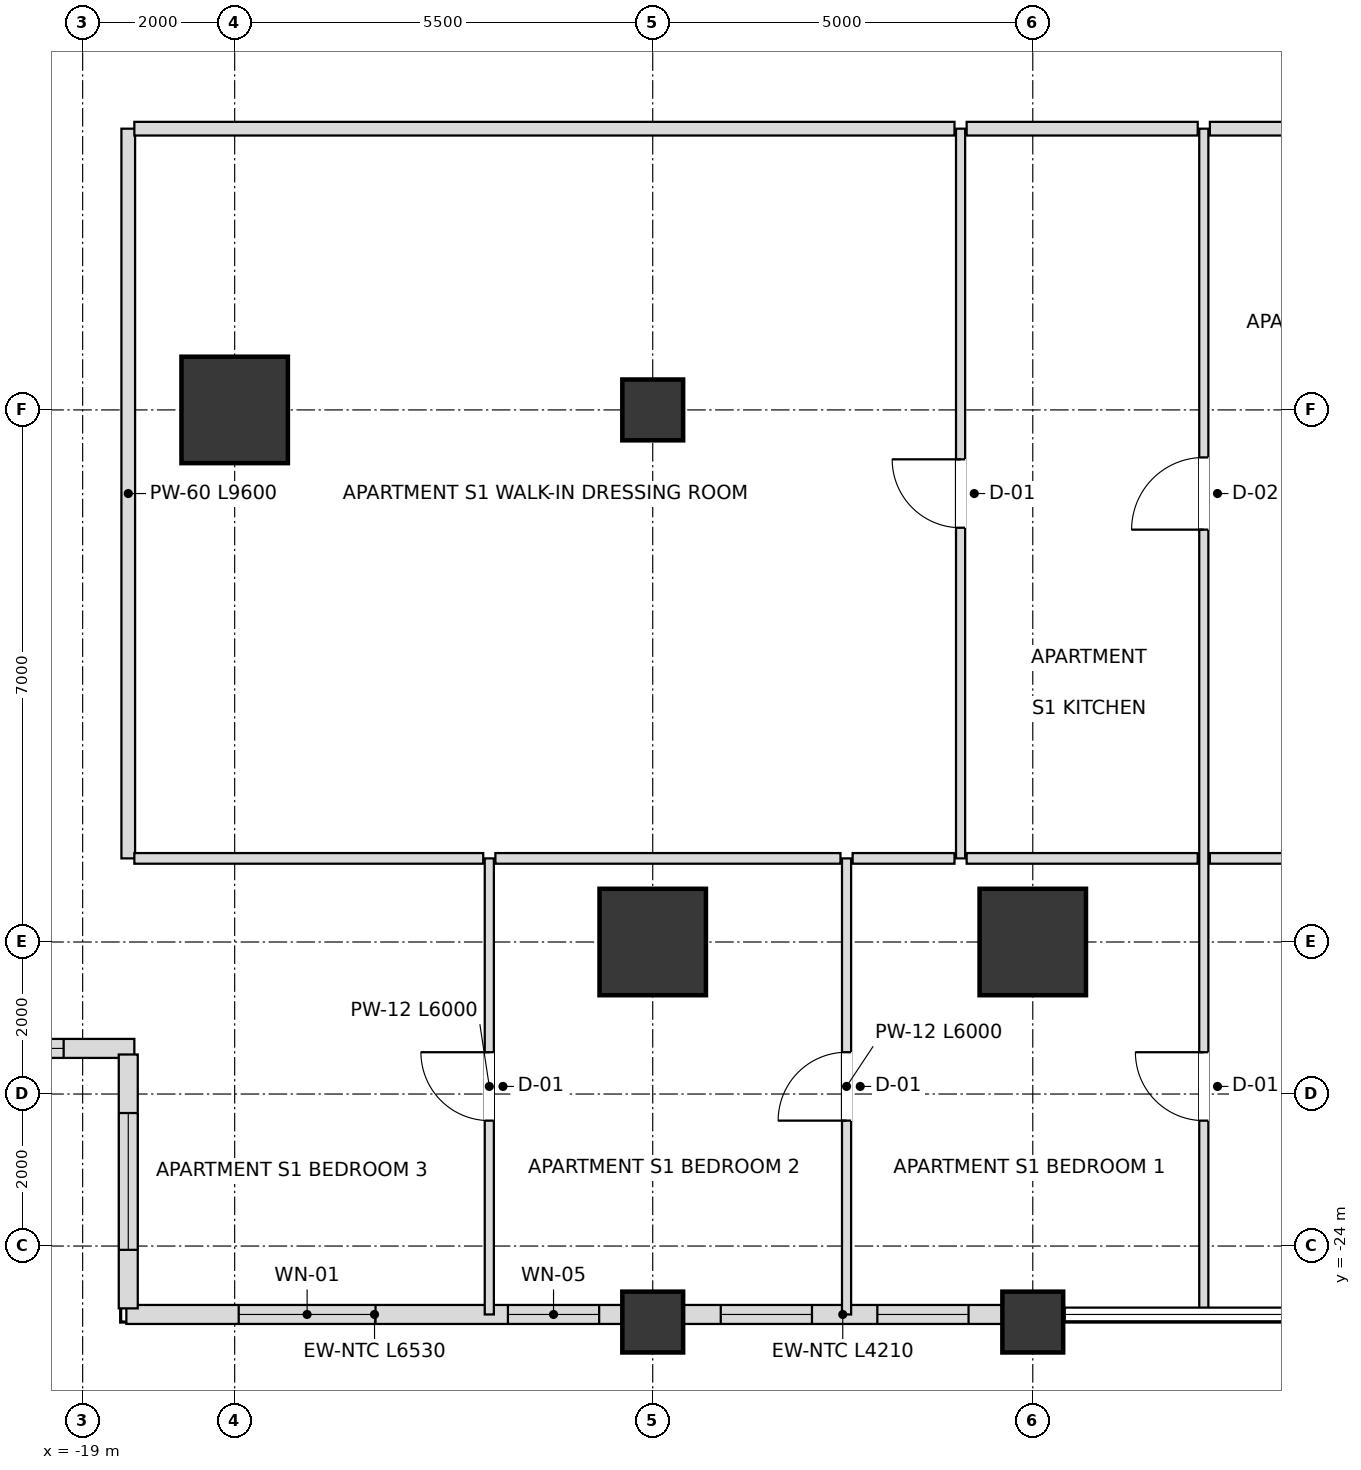
"""IFC4 building model, lengths in metres.
Left out: names, types, materials, properties, quantities, classifications, styles, units other than length and angle.
Written with IfcOpenShell. Run it as: python <this file> out.ifc"""

import sys

from ifc_helpers import new_model, si_unit, direction, frame, frame_2d, origin, origin_2d, place, context, subcontext, project, spatial, rectangle, extrude, element, fill, save


model = new_model("IFC4")
c1 = context("Model", 3, precision=1e-05, world=origin(), true_north=direction((0.0, 1.0)))
c2 = subcontext(c1, "Body", "Model", "MODEL_VIEW")
j1 = project(units=[si_unit("LENGTHUNIT", "METRE"), si_unit("PLANEANGLEUNIT", "RADIAN")], contexts=[c1])
p1 = place(None, origin())
s1 = spatial("IfcSite", under=j1, at=p1, CompositionType="ELEMENT")
p2 = place(p1, origin())
s2 = spatial("IfcBuilding", under=s1, at=p2, CompositionType="ELEMENT")
p3 = place(p2, frame((0.0, 0.0, 54.0)))
s3 = spatial("IfcBuildingStorey", under=s2, at=p3, CompositionType="ELEMENT", Elevation=54.0)
for number, where, z_axis, x_axis in (
    (1, (-11.5, -20.0, 0.0), (0.0, 0.0, 1.0), (1.0, 0.0, 0.0)),
    (2, (-6.5, -20.0, 0.0), (0.0, 0.0, 1.0), (1.0, 0.0, 0.0)),
    (3, (-17.0, -13.0, 0.0), (0.0, 0.0, 1.0), (1.0, 0.0, 0.0)),
):
    element("IfcColumn", number, at=place(p3, frame(where, z_axis=z_axis, x_axis=x_axis)), inside=s3, PredefinedType="USERDEFINED", context=c2, shape_type="SweptSolid", body=[
        extrude(rectangle(XDim=1.4, YDim=1.4, at=origin_2d()), origin(), (0.0, 0.0, 1.0), 3.6),
    ])
for number, where, z_axis, x_axis in (
    (4, (-11.5, -13.0, 0.0), (0.0, 0.0, 1.0), (1.0, 0.0, 0.0)),
    (5, (-11.5, -25.0, 0.0), (0.0, 0.0, 1.0), (1.0, 0.0, 0.0)),
    (6, (-6.5, -25.0, 0.0), (0.0, 0.0, 1.0), (1.0, 0.0, 0.0)),
):
    element("IfcColumn", number, at=place(p3, frame(where, z_axis=z_axis, x_axis=x_axis)), inside=s3, PredefinedType="COLUMN", context=c2, shape_type="SweptSolid", body=[
        extrude(rectangle(XDim=0.8, YDim=0.8, at=origin_2d()), origin(), (0.0, 0.0, 1.0), 3.6),
    ])
p4 = place(p3, frame((-18.425, -24.9, 0.0), z_axis=(0.0, 0.0, 1.0), x_axis=(1.0, 0.0, 0.0)))
e7 = element("IfcWall", 7, at=p4, inside=s3, PredefinedType="SOLIDWALL", context=c2, shape_type="SweptSolid", body=[
    extrude(rectangle(XDim=6.53, YDim=0.25, at=frame_2d((3.265, 0.0))), origin(), (0.0, 0.0, 1.0), 2.736),
])
p5 = place(p4, frame((1.478, 0.0, 0.72)))
e8 = element("IfcOpeningElement", 8, at=p5, cuts=e7, PredefinedType="OPENING", context=c2, shape_type="SweptSolid", body=[
    extrude(rectangle(XDim=1.8, YDim=1.68, at=frame_2d((0.9, 0.84))), frame((0.0, 0.135, 0.0), z_axis=(0.0, -1.0, 0.0), x_axis=(1.0, 0.0, 0.0)), (0.0, 0.0, 1.0), 0.27),
])
p6 = place(p4, frame((5.02, 0.0, 0.72)))
e9 = element("IfcOpeningElement", 9, at=p6, cuts=e7, PredefinedType="OPENING", context=c2, shape_type="SweptSolid", body=[
    extrude(rectangle(XDim=1.2, YDim=1.68, at=frame_2d((0.6, 0.84))), frame((0.0, 0.135, 0.0), z_axis=(0.0, -1.0, 0.0), x_axis=(1.0, 0.0, 0.0)), (0.0, 0.0, 1.0), 0.27),
])
p7 = place(p3, frame((-11.105, -24.9, 0.0), z_axis=(0.0, 0.0, 1.0), x_axis=(1.0, 0.0, 0.0)))
e10 = element("IfcWall", 10, at=p7, inside=s3, PredefinedType="SOLIDWALL", context=c2, shape_type="SweptSolid", body=[
    extrude(rectangle(XDim=4.21, YDim=0.25, at=frame_2d((2.105, 0.0))), origin(), (0.0, 0.0, 1.0), 2.736),
])
p8 = place(p7, frame((0.5, 0.0, 0.72)))
e11 = element("IfcOpeningElement", 11, at=p8, cuts=e10, PredefinedType="OPENING", context=c2, shape_type="SweptSolid", body=[
    extrude(rectangle(XDim=1.2, YDim=1.68, at=frame_2d((0.6, 0.84))), frame((0.0, 0.135, 0.0), z_axis=(0.0, -1.0, 0.0), x_axis=(1.0, 0.0, 0.0)), (0.0, 0.0, 1.0), 0.27),
])
p9 = place(p7, frame((2.56, 0.0, 0.72)))
e12 = element("IfcOpeningElement", 12, at=p9, cuts=e10, PredefinedType="OPENING", context=c2, shape_type="SweptSolid", body=[
    extrude(rectangle(XDim=1.2, YDim=1.68, at=frame_2d((0.6, 0.84))), frame((0.0, 0.135, 0.0), z_axis=(0.0, -1.0, 0.0), x_axis=(1.0, 0.0, 0.0)), (0.0, 0.0, 1.0), 0.27),
])
p10 = place(p3, frame((-21.98, -21.4, 0.0), z_axis=(0.0, 0.0, 1.0), x_axis=(1.0, 0.0, 0.0)))
e13 = element("IfcWall", 13, at=p10, inside=s3, PredefinedType="SOLIDWALL", context=c2, shape_type="SweptSolid", body=[
    extrude(rectangle(XDim=3.66, YDim=0.25, at=frame_2d((1.83, 0.0))), origin(), (0.0, 0.0, 1.0), 2.736),
])
p11 = place(p10, frame((0.93, 0.0, 0.72)))
e14 = element("IfcOpeningElement", 14, at=p11, cuts=e13, PredefinedType="OPENING", context=c2, shape_type="SweptSolid", body=[
    extrude(rectangle(XDim=1.8, YDim=1.68, at=frame_2d((0.9, 0.84))), frame((0.0, 0.135, 0.0), z_axis=(0.0, -1.0, 0.0), x_axis=(1.0, 0.0, 0.0)), (0.0, 0.0, 1.0), 0.27),
])
p12 = place(p3, frame((-18.4, -21.48, 0.0), z_axis=(0.0, 0.0, 1.0), x_axis=(0.0, -1.0, 0.0)))
e15 = element("IfcWall", 15, at=p12, inside=s3, PredefinedType="SOLIDWALL", context=c2, shape_type="SweptSolid", body=[
    extrude(rectangle(XDim=3.34, YDim=0.25, at=frame_2d((1.67, 0.0))), origin(), (0.0, 0.0, 1.0), 2.736),
])
p13 = place(p12, frame((0.77, 0.0, 0.72)))
e16 = element("IfcOpeningElement", 16, at=p13, cuts=e15, PredefinedType="OPENING", context=c2, shape_type="SweptSolid", body=[
    extrude(rectangle(XDim=1.8, YDim=1.68, at=frame_2d((0.9, 0.84))), frame((0.0, 0.135, 0.0), z_axis=(0.0, -1.0, 0.0), x_axis=(1.0, 0.0, 0.0)), (0.0, 0.0, 1.0), 0.27),
])
p14 = place(p3, frame((-18.4, -18.9, 0.0), z_axis=(0.0, 0.0, 1.0), x_axis=(0.0, 1.0, 0.0)))
e17 = element("IfcWall", 17, at=p14, inside=s3, PredefinedType="PARTITIONING", context=c2, shape_type="SweptSolid", body=[
    extrude(rectangle(XDim=9.6, YDim=0.18, at=frame_2d((4.8, 0.0))), origin(), (0.0, 0.0, 1.0), 2.736),
])
p15 = place(p3, frame((-13.65, -24.9, 0.0), z_axis=(0.0, 0.0, 1.0), x_axis=(0.0, 1.0, 0.0)))
e18 = element("IfcWall", 18, at=p15, inside=s3, PredefinedType="PARTITIONING", context=c2, shape_type="SweptSolid", body=[
    extrude(rectangle(XDim=6.0, YDim=0.12, at=frame_2d((3.0, 0.0))), origin(), (0.0, 0.0, 1.0), 2.736),
])
p16 = place(p15, frame((2.55, 0.0, 0.0)))
e19 = element("IfcOpeningElement", 19, at=p16, cuts=e18, PredefinedType="OPENING", context=c2, shape_type="SweptSolid", body=[
    extrude(rectangle(XDim=0.9, YDim=2.1, at=frame_2d((0.45, 1.05))), frame((0.0, 0.07, 0.0), z_axis=(0.0, -1.0, 0.0), x_axis=(1.0, 0.0, 0.0)), (0.0, 0.0, 1.0), 0.14),
])
p17 = place(p3, frame((-8.95, -24.9, 0.0), z_axis=(0.0, 0.0, 1.0), x_axis=(0.0, 1.0, 0.0)))
e20 = element("IfcWall", 20, at=p17, inside=s3, PredefinedType="PARTITIONING", context=c2, shape_type="SweptSolid", body=[
    extrude(rectangle(XDim=6.0, YDim=0.12, at=frame_2d((3.0, 0.0))), origin(), (0.0, 0.0, 1.0), 2.816),
])
p18 = place(p17, frame((2.55, 0.0, 0.0)))
e21 = element("IfcOpeningElement", 21, at=p18, cuts=e20, PredefinedType="OPENING", context=c2, shape_type="SweptSolid", body=[
    extrude(rectangle(XDim=0.9, YDim=2.1, at=frame_2d((0.45, 1.05))), frame((0.0, 0.07, 0.0), z_axis=(0.0, -1.0, 0.0), x_axis=(1.0, 0.0, 0.0)), (0.0, 0.0, 1.0), 0.14),
])
p19 = place(p3, frame((-7.45, -18.9, 0.0), z_axis=(0.0, 0.0, 1.0), x_axis=(0.0, 1.0, 0.0)))
e22 = element("IfcWall", 22, at=p19, inside=s3, PredefinedType="PARTITIONING", context=c2, shape_type="SweptSolid", body=[
    extrude(rectangle(XDim=9.6, YDim=0.12, at=frame_2d((4.8, 0.0))), origin(), (0.0, 0.0, 1.0), 2.816),
])
p20 = place(p19, frame((4.35, 0.0, 0.0)))
e23 = element("IfcOpeningElement", 23, at=p20, cuts=e22, PredefinedType="OPENING", context=c2, shape_type="SweptSolid", body=[
    extrude(rectangle(XDim=0.9, YDim=2.1, at=frame_2d((0.45, 1.05))), frame((0.0, 0.07, 0.0), z_axis=(0.0, -1.0, 0.0), x_axis=(1.0, 0.0, 0.0)), (0.0, 0.0, 1.0), 0.14),
])
p21 = place(p3, frame((-4.25, -24.9, 0.0), z_axis=(0.0, 0.0, 1.0), x_axis=(0.0, 1.0, 0.0)))
e24 = element("IfcWall", 24, at=p21, inside=s3, PredefinedType="PARTITIONING", context=c2, shape_type="SweptSolid", body=[
    extrude(rectangle(XDim=15.6, YDim=0.12, at=frame_2d((7.8, 0.0))), origin(), (0.0, 0.0, 1.0), 2.816),
])
p22 = place(p21, frame((10.325, 0.0, 0.0)))
e25 = element("IfcOpeningElement", 25, at=p22, cuts=e24, PredefinedType="OPENING", context=c2, shape_type="SweptSolid", body=[
    extrude(rectangle(XDim=0.95, YDim=2.1, at=frame_2d((0.475, 1.05))), frame((0.0, 0.07, 0.0), z_axis=(0.0, -1.0, 0.0), x_axis=(1.0, 0.0, 0.0)), (0.0, 0.0, 1.0), 0.14),
])
p23 = place(p21, frame((2.55, 0.0, 0.0)))
e26 = element("IfcOpeningElement", 26, at=p23, cuts=e24, PredefinedType="OPENING", context=c2, shape_type="SweptSolid", body=[
    extrude(rectangle(XDim=0.9, YDim=2.1, at=frame_2d((0.45, 1.05))), frame((0.0, 0.07, 0.0), z_axis=(0.0, -1.0, 0.0), x_axis=(1.0, 0.0, 0.0)), (0.0, 0.0, 1.0), 0.14),
])
p24 = place(p3, frame((-18.32, -18.9, 0.0), z_axis=(0.0, 0.0, 1.0), x_axis=(1.0, 0.0, 0.0)))
e27 = element("IfcWall", 27, at=p24, inside=s3, PredefinedType="PARTITIONING", context=c2, shape_type="SweptSolid", body=[
    extrude(rectangle(XDim=4.59, YDim=0.14, at=frame_2d((2.295, 0.0))), origin(), (0.0, 0.0, 1.0), 2.736),
])
p25 = place(p3, frame((-13.57, -18.9, 0.0), z_axis=(0.0, 0.0, 1.0), x_axis=(1.0, 0.0, 0.0)))
e28 = element("IfcWall", 28, at=p25, inside=s3, PredefinedType="PARTITIONING", context=c2, shape_type="SweptSolid", body=[
    extrude(rectangle(XDim=4.54, YDim=0.14, at=frame_2d((2.27, 0.0))), origin(), (0.0, 0.0, 1.0), 2.736),
])
p26 = place(p3, frame((-8.87, -18.9, 0.0), z_axis=(0.0, 0.0, 1.0), x_axis=(1.0, 0.0, 0.0)))
e29 = element("IfcWall", 29, at=p26, inside=s3, PredefinedType="PARTITIONING", context=c2, shape_type="SweptSolid", body=[
    extrude(rectangle(XDim=1.34, YDim=0.14, at=frame_2d((0.67, 0.0))), origin(), (0.0, 0.0, 1.0), 3.38),
])
p27 = place(p3, frame((-7.37, -18.9, 0.0), z_axis=(0.0, 0.0, 1.0), x_axis=(1.0, 0.0, 0.0)))
e30 = element("IfcWall", 30, at=p27, inside=s3, PredefinedType="PARTITIONING", context=c2, shape_type="SweptSolid", body=[
    extrude(rectangle(XDim=3.04, YDim=0.14, at=frame_2d((1.52, 0.0))), origin(), (0.0, 0.0, 1.0), 2.816),
])
p28 = place(p3, frame((-4.17, -18.9, 0.0), z_axis=(0.0, 0.0, 1.0), x_axis=(1.0, 0.0, 0.0)))
e31 = element("IfcWall", 31, at=p28, inside=s3, PredefinedType="PARTITIONING", context=c2, shape_type="SweptSolid", body=[
    extrude(rectangle(XDim=4.04, YDim=0.14, at=frame_2d((2.02, 0.0))), origin(), (0.0, 0.0, 1.0), 3.38),
])
p29 = place(p28, frame((1.565, 0.0, 0.0)))
e32 = element("IfcOpeningElement", 32, at=p29, cuts=e31, PredefinedType="OPENING", context=c2, shape_type="SweptSolid", body=[
    extrude(rectangle(XDim=0.95, YDim=2.1, at=frame_2d((0.475, 1.05))), frame((0.0, 0.08, 0.0), z_axis=(0.0, -1.0, 0.0), x_axis=(1.0, 0.0, 0.0)), (0.0, 0.0, 1.0), 0.16),
])
p30 = place(p3, frame((-18.32, -9.3, 0.0), z_axis=(0.0, 0.0, 1.0), x_axis=(1.0, 0.0, 0.0)))
e33 = element("IfcWall", 33, at=p30, inside=s3, PredefinedType="PARTITIONING", context=c2, shape_type="SweptSolid", body=[
    extrude(rectangle(XDim=10.79, YDim=0.18, at=frame_2d((5.395, 0.0))), origin(), (0.0, 0.0, 1.0), 2.816),
])
p31 = place(p3, frame((-7.37, -9.3, 0.0), z_axis=(0.0, 0.0, 1.0), x_axis=(1.0, 0.0, 0.0)))
e34 = element("IfcWall", 34, at=p31, inside=s3, PredefinedType="PARTITIONING", context=c2, shape_type="SweptSolid", body=[
    extrude(rectangle(XDim=3.04, YDim=0.18, at=frame_2d((1.52, 0.0))), origin(), (0.0, 0.0, 1.0), 2.816),
])
p32 = place(p3, frame((-4.17, -9.3, 0.0), z_axis=(0.0, 0.0, 1.0), x_axis=(1.0, 0.0, 0.0)))
e35 = element("IfcWall", 35, at=p32, inside=s3, PredefinedType="PARTITIONING", context=c2, shape_type="SweptSolid", body=[
    extrude(rectangle(XDim=4.04, YDim=0.18, at=frame_2d((2.02, 0.0))), origin(), (0.0, 0.0, 1.0), 3.38),
])
p33 = place(p32, frame((1.565, 0.0, 0.0)))
e36 = element("IfcOpeningElement", 36, at=p33, cuts=e35, PredefinedType="OPENING", context=c2, shape_type="SweptSolid", body=[
    extrude(rectangle(XDim=0.95, YDim=2.15, at=frame_2d((0.475, 1.075))), frame((0.0, 0.1, 0.0), z_axis=(0.0, -1.0, 0.0), x_axis=(1.0, 0.0, 0.0)), (0.0, 0.0, 1.0), 0.2),
])
p34 = place(p5, origin())
e37 = element("IfcWindow", 37, at=p34, inside=s3, PartitioningType="SINGLE_PANEL", PredefinedType="WINDOW", context=c2, shape_type="SweptSolid", body=[
    extrude(rectangle(XDim=1.8, YDim=1.68, at=frame_2d((0.9, 0.84))), frame((0.0, 0.03, 0.0), z_axis=(0.0, -1.0, 0.0), x_axis=(1.0, 0.0, 0.0)), (0.0, 0.0, 1.0), 0.06),
])
fill(e8, e37)
p35 = place(p6, origin())
e38 = element("IfcWindow", 38, at=p35, inside=s3, PartitioningType="SINGLE_PANEL", PredefinedType="WINDOW", context=c2, shape_type="SweptSolid", body=[
    extrude(rectangle(XDim=1.2, YDim=1.68, at=frame_2d((0.6, 0.84))), frame((0.0, 0.03, 0.0), z_axis=(0.0, -1.0, 0.0), x_axis=(1.0, 0.0, 0.0)), (0.0, 0.0, 1.0), 0.06),
])
fill(e9, e38)
p36 = place(p8, origin())
e39 = element("IfcWindow", 39, at=p36, inside=s3, PartitioningType="SINGLE_PANEL", PredefinedType="WINDOW", context=c2, shape_type="SweptSolid", body=[
    extrude(rectangle(XDim=1.2, YDim=1.68, at=frame_2d((0.6, 0.84))), frame((0.0, 0.03, 0.0), z_axis=(0.0, -1.0, 0.0), x_axis=(1.0, 0.0, 0.0)), (0.0, 0.0, 1.0), 0.06),
])
fill(e11, e39)
p37 = place(p9, origin())
e40 = element("IfcWindow", 40, at=p37, inside=s3, PartitioningType="SINGLE_PANEL", PredefinedType="WINDOW", context=c2, shape_type="SweptSolid", body=[
    extrude(rectangle(XDim=1.2, YDim=1.68, at=frame_2d((0.6, 0.84))), frame((0.0, 0.03, 0.0), z_axis=(0.0, -1.0, 0.0), x_axis=(1.0, 0.0, 0.0)), (0.0, 0.0, 1.0), 0.06),
])
fill(e12, e40)
p38 = place(p11, origin())
e41 = element("IfcWindow", 41, at=p38, inside=s3, PartitioningType="SINGLE_PANEL", PredefinedType="WINDOW", context=c2, shape_type="SweptSolid", body=[
    extrude(rectangle(XDim=1.8, YDim=1.68, at=frame_2d((0.9, 0.84))), frame((0.0, 0.03, 0.0), z_axis=(0.0, -1.0, 0.0), x_axis=(1.0, 0.0, 0.0)), (0.0, 0.0, 1.0), 0.06),
])
fill(e14, e41)
p39 = place(p13, origin())
e42 = element("IfcWindow", 42, at=p39, inside=s3, PartitioningType="SINGLE_PANEL", PredefinedType="WINDOW", context=c2, shape_type="SweptSolid", body=[
    extrude(rectangle(XDim=1.8, YDim=1.68, at=frame_2d((0.9, 0.84))), frame((0.0, 0.03, 0.0), z_axis=(0.0, -1.0, 0.0), x_axis=(1.0, 0.0, 0.0)), (0.0, 0.0, 1.0), 0.06),
])
fill(e16, e42)
p40 = place(p22, origin())
e43 = element("IfcDoor", 43, at=p40, inside=s3, OperationType="SINGLE_SWING_LEFT", PredefinedType="DOOR", context=c2, shape_type="SweptSolid", body=[
    extrude(rectangle(XDim=0.95, YDim=2.1, at=frame_2d((0.475, 1.05))), frame((0.0, 0.025, 0.0), z_axis=(0.0, -1.0, 0.0), x_axis=(1.0, 0.0, 0.0)), (0.0, 0.0, 1.0), 0.05),
])
fill(e25, e43)
p41 = place(p20, origin())
e44 = element("IfcDoor", 44, at=p41, inside=s3, OperationType="SINGLE_SWING_RIGHT", PredefinedType="DOOR", context=c2, shape_type="SweptSolid", body=[
    extrude(rectangle(XDim=0.9, YDim=2.1, at=frame_2d((0.45, 1.05))), frame((0.0, 0.025, 0.0), z_axis=(0.0, -1.0, 0.0), x_axis=(1.0, 0.0, 0.0)), (0.0, 0.0, 1.0), 0.05),
])
fill(e23, e44)
p42 = place(p23, origin())
e45 = element("IfcDoor", 45, at=p42, inside=s3, OperationType="SINGLE_SWING_RIGHT", PredefinedType="DOOR", context=c2, shape_type="SweptSolid", body=[
    extrude(rectangle(XDim=0.9, YDim=2.1, at=frame_2d((0.45, 1.05))), frame((0.0, 0.025, 0.0), z_axis=(0.0, -1.0, 0.0), x_axis=(1.0, 0.0, 0.0)), (0.0, 0.0, 1.0), 0.05),
])
fill(e26, e45)
p43 = place(p18, origin())
e46 = element("IfcDoor", 46, at=p43, inside=s3, OperationType="SINGLE_SWING_LEFT", PredefinedType="DOOR", context=c2, shape_type="SweptSolid", body=[
    extrude(rectangle(XDim=0.9, YDim=2.1, at=frame_2d((0.45, 1.05))), frame((0.0, 0.025, 0.0), z_axis=(0.0, -1.0, 0.0), x_axis=(1.0, 0.0, 0.0)), (0.0, 0.0, 1.0), 0.05),
])
fill(e21, e46)
p44 = place(p16, origin())
e47 = element("IfcDoor", 47, at=p44, inside=s3, OperationType="SINGLE_SWING_RIGHT", PredefinedType="DOOR", context=c2, shape_type="SweptSolid", body=[
    extrude(rectangle(XDim=0.9, YDim=2.1, at=frame_2d((0.45, 1.05))), frame((0.0, 0.025, 0.0), z_axis=(0.0, -1.0, 0.0), x_axis=(1.0, 0.0, 0.0)), (0.0, 0.0, 1.0), 0.05),
])
fill(e19, e47)
save(model, sys.argv[1])
